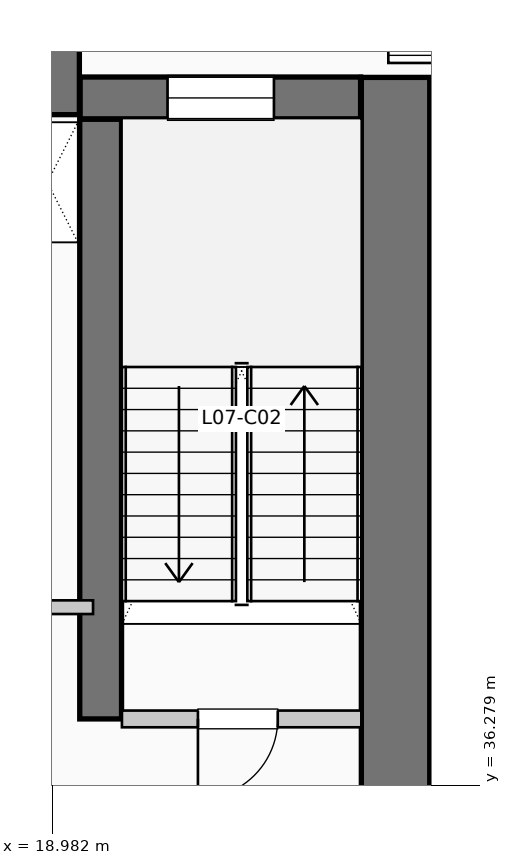
"""IFC4 building model, lengths in metres.
Left out: names, types, materials, properties, quantities, classifications, styles, units other than length and angle.
Written with IfcOpenShell. Run it as: python <this file> out.ifc"""

import sys

from ifc_helpers import new_model, si_unit, direction, frame, frame_2d, origin, place, context, subcontext, project, spatial, rectangle, extrude, element, fill, save


model = new_model("IFC4")
c1 = context("Model", 3, precision=1e-05, world=origin(), true_north=direction((0.0, 1.0)))
c2 = subcontext(c1, "Body", "Model", "MODEL_VIEW")
j1 = project(units=[si_unit("LENGTHUNIT", "METRE"), si_unit("PLANEANGLEUNIT", "RADIAN")], contexts=[c1])
p1 = place(None, origin())
s1 = spatial("IfcSite", under=j1, at=p1, CompositionType="ELEMENT")
p2 = place(p1, origin())
s2 = spatial("IfcBuilding", under=s1, at=p2, CompositionType="ELEMENT")
p3 = place(p2, frame((0.0, 0.0, 34.32)))
s3 = spatial("IfcBuildingStorey", under=s2, at=p3, CompositionType="ELEMENT", Elevation=34.32)
p4 = place(p3, frame((5.36, 45.55, 0.0), z_axis=(0.0, 0.0, 1.0), x_axis=(1.0, 0.0, 0.0)))
e1 = element("IfcWall", 1, at=p4, inside=s3, PredefinedType="SHEAR", context=c2, shape_type="SweptSolid", body=[
    extrude(rectangle(XDim=13.98, YDim=0.9, at=frame_2d((6.99, 0.0))), origin(), (0.0, 0.0, 1.0), 3.96),
])
p5 = place(p3, frame((23.5, 34.95, 0.0), z_axis=(0.0, 0.0, 1.0), x_axis=(0.0, 1.0, 0.0)))
e2 = element("IfcWall", 2, at=p5, inside=s3, PredefinedType="SHEAR", context=c2, shape_type="SweptSolid", body=[
    extrude(rectangle(XDim=10.64, YDim=0.9, at=frame_2d((5.32, 0.0))), origin(), (0.0, 0.0, 1.0), 3.96),
])
p6 = place(p3, frame((19.62, 37.15, 0.0), z_axis=(0.0, 0.0, 1.0), x_axis=(0.0, 1.0, 0.0)))
e3 = element("IfcWall", 3, at=p6, inside=s3, PredefinedType="SHEAR", context=c2, shape_type="SweptSolid", body=[
    extrude(rectangle(XDim=7.89, YDim=0.55, at=frame_2d((3.945, 0.0))), origin(), (0.0, 0.0, 1.0), 3.96),
])
p7 = place(p3, frame((19.35, 45.32, 0.0), z_axis=(0.0, 0.0, 1.0), x_axis=(1.0, 0.0, 0.0)))
e4 = element("IfcWall", 4, at=p7, inside=s3, PredefinedType="SHEAR", context=c2, shape_type="SweptSolid", body=[
    extrude(rectangle(XDim=3.69, YDim=0.55, at=frame_2d((1.845, 0.0))), origin(), (0.0, 0.0, 1.0), 3.96),
])
p8 = place(p7, frame((1.15, 0.0, 1.05)))
e5 = element("IfcOpeningElement", 5, at=p8, cuts=e4, PredefinedType="OPENING", context=c2, shape_type="SweptSolid", body=[
    extrude(rectangle(XDim=1.4, YDim=1.8, at=frame_2d((0.7, 0.9))), frame((0.0, 0.285, 0.0), z_axis=(0.0, -1.0, 0.0), x_axis=(1.0, 0.0, 0.0)), (0.0, 0.0, 1.0), 0.57),
])
p9 = place(p3, frame((19.9, 37.15, 0.0), z_axis=(0.0, 0.0, 1.0), x_axis=(1.0, 0.0, 0.0)))
e6 = element("IfcWall", 6, at=p9, inside=s3, PredefinedType="PARTITIONING", context=c2, shape_type="SweptSolid", body=[
    extrude(rectangle(XDim=3.15, YDim=0.22, at=frame_2d((1.575, 0.0))), origin(), (0.0, 0.0, 1.0), 3.71),
])
p10 = place(p9, frame((2.05, 0.0, 0.0), z_axis=(0.0, 0.0, 1.0), x_axis=(-1.0, 0.0, 0.0)))
e7 = element("IfcOpeningElement", 7, at=p10, cuts=e6, PredefinedType="OPENING", context=c2, shape_type="SweptSolid", body=[
    extrude(rectangle(XDim=1.05, YDim=2.15, at=frame_2d((0.525, 1.075))), frame((0.0, 0.12, 0.0), z_axis=(0.0, -1.0, 0.0), x_axis=(1.0, 0.0, 0.0)), (0.0, 0.0, 1.0), 0.24),
])
p11 = place(p3, frame((17.68, 38.62, 0.0), z_axis=(0.0, 0.0, 1.0), x_axis=(1.0, 0.0, 0.0)))
e8 = element("IfcWall", 8, at=p11, inside=s3, PredefinedType="PARTITIONING", context=c2, shape_type="SweptSolid", body=[
    extrude(rectangle(XDim=1.84, YDim=0.18, at=frame_2d((0.92, 0.0))), origin(), (0.0, 0.0, 1.0), 3.71),
])
p12 = place(p11, frame((0.24, 0.0, 0.0)))
e9 = element("IfcOpeningElement", 9, at=p12, cuts=e8, PredefinedType="OPENING", context=c2, shape_type="SweptSolid", body=[
    extrude(rectangle(XDim=0.92, YDim=2.1, at=frame_2d((0.46, 1.05))), frame((0.0, 0.1, 0.0), z_axis=(0.0, -1.0, 0.0), x_axis=(1.0, 0.0, 0.0)), (0.0, 0.0, 1.0), 0.2),
])
p13 = place(p8, origin())
e10 = element("IfcWindow", 10, at=p13, inside=s3, PartitioningType="SINGLE_PANEL", PredefinedType="WINDOW", context=c2, shape_type="SweptSolid", body=[
    extrude(rectangle(XDim=1.4, YDim=1.8, at=frame_2d((0.7, 0.9))), frame((0.0, 0.03, 0.0), z_axis=(0.0, -1.0, 0.0), x_axis=(1.0, 0.0, 0.0)), (0.0, 0.0, 1.0), 0.06),
])
fill(e5, e10)
p14 = place(p10, origin())
e11 = element("IfcDoor", 11, at=p14, inside=s3, OperationType="SINGLE_SWING_LEFT", PredefinedType="DOOR", context=c2, shape_type="SweptSolid", body=[
    extrude(rectangle(XDim=1.05, YDim=2.15, at=frame_2d((0.525, 1.075))), frame((0.0, 0.025, 0.0), z_axis=(0.0, -1.0, 0.0), x_axis=(1.0, 0.0, 0.0)), (0.0, 0.0, 1.0), 0.05),
])
fill(e7, e11)
save(model, sys.argv[1])
